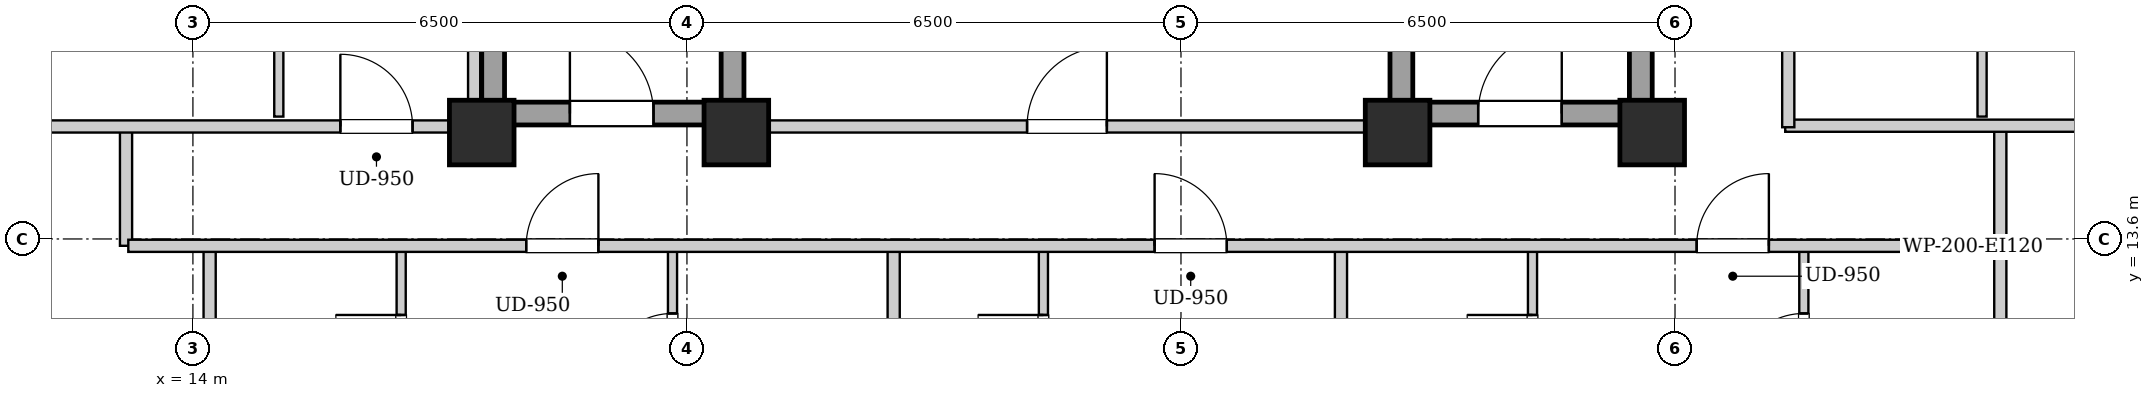
"""IFC4 building model, lengths in metres.
Left out: names, types, materials, properties, quantities, classifications, styles, units other than length and angle.
Written with IfcOpenShell. Run it as: python <this file> out.ifc"""

import sys

from ifc_helpers import new_model, si_unit, direction, frame, frame_2d, origin, origin_2d, place, context, subcontext, project, spatial, rectangle, extrude, element, fill, save


model = new_model("IFC4")
c1 = context("Model", 3, precision=1e-05, world=origin(), true_north=direction((0.0, 1.0)))
c2 = subcontext(c1, "Body", "Model", "MODEL_VIEW")
j1 = project(units=[si_unit("LENGTHUNIT", "METRE"), si_unit("PLANEANGLEUNIT", "RADIAN")], contexts=[c1])
p1 = place(None, origin())
s1 = spatial("IfcSite", under=j1, at=p1, CompositionType="ELEMENT")
p2 = place(p1, origin())
s2 = spatial("IfcBuilding", under=s1, at=p2, CompositionType="ELEMENT")
p3 = place(p2, frame((0.0, 0.0, 210.7)))
s3 = spatial("IfcBuildingStorey", under=s2, at=p3, CompositionType="ELEMENT", Elevation=210.7)
for number, where, z_axis, x_axis in (
    (1, (17.8, 15.0, 0.0), (0.0, 0.0, 1.0), (1.0, 0.0, 0.0)),
    (2, (21.15, 15.0, 0.0), (0.0, 0.0, 1.0), (1.0, 0.0, 0.0)),
    (3, (29.85, 15.0, 0.0), (0.0, 0.0, 1.0), (1.0, 0.0, 0.0)),
    (4, (33.2, 15.0, 0.0), (0.0, 0.0, 1.0), (1.0, 0.0, 0.0)),
):
    element("IfcColumn", number, at=place(p3, frame(where, z_axis=z_axis, x_axis=x_axis)), inside=s3, PredefinedType="COLUMN", context=c2, shape_type="SweptSolid", body=[
        extrude(rectangle(XDim=0.85, YDim=0.85, at=origin_2d()), origin(), (0.0, 0.0, 1.0), 3.3),
    ])
for number, where, z_axis, x_axis in (
    (5, (17.95, 15.1, 0.0), (0.0, 0.0, 1.0), (0.0, 1.0, 0.0)),
    (6, (21.1, 15.1, 0.0), (0.0, 0.0, 1.0), (0.0, 1.0, 0.0)),
):
    element("IfcWall", number, at=place(p3, frame(where, z_axis=z_axis, x_axis=x_axis)), inside=s3, PredefinedType="SHEAR", context=c2, shape_type="SweptSolid", body=[
        extrude(rectangle(XDim=9.0, YDim=0.3, at=frame_2d((4.5, 0.0))), origin(), (0.0, 0.0, 1.0), 3.04),
    ])
p4 = place(p3, frame((18.1, 15.25, 0.0), z_axis=(0.0, 0.0, 1.0), x_axis=(1.0, 0.0, 0.0)))
e7 = element("IfcWall", 7, at=p4, inside=s3, PredefinedType="SHEAR", context=c2, shape_type="SweptSolid", body=[
    extrude(rectangle(XDim=2.85, YDim=0.3, at=frame_2d((1.425, 0.0))), origin(), (0.0, 0.0, 1.0), 3.04),
])
p5 = place(p4, frame((0.86, 0.0, 0.0)))
e8 = element("IfcOpeningElement", 8, at=p5, cuts=e7, PredefinedType="OPENING", context=c2, shape_type="SweptSolid", body=[
    extrude(rectangle(XDim=1.1, YDim=2.05, at=frame_2d((0.55, 1.025))), frame((0.0, 0.16, 0.0), z_axis=(0.0, -1.0, 0.0), x_axis=(1.0, 0.0, 0.0)), (0.0, 0.0, 1.0), 0.32),
])
for number, where, z_axis, x_axis in (
    (9, (29.9, 15.1, 0.0), (0.0, 0.0, 1.0), (0.0, 1.0, 0.0)),
    (10, (33.05, 15.1, 0.0), (0.0, 0.0, 1.0), (0.0, 1.0, 0.0)),
):
    element("IfcWall", number, at=place(p3, frame(where, z_axis=z_axis, x_axis=x_axis)), inside=s3, PredefinedType="SHEAR", context=c2, shape_type="SweptSolid", body=[
        extrude(rectangle(XDim=9.0, YDim=0.3, at=frame_2d((4.5, 0.0))), origin(), (0.0, 0.0, 1.0), 3.04),
    ])
p6 = place(p3, frame((30.05, 15.25, 0.0), z_axis=(0.0, 0.0, 1.0), x_axis=(1.0, 0.0, 0.0)))
e11 = element("IfcWall", 11, at=p6, inside=s3, PredefinedType="SHEAR", context=c2, shape_type="SweptSolid", body=[
    extrude(rectangle(XDim=2.85, YDim=0.3, at=frame_2d((1.425, 0.0))), origin(), (0.0, 0.0, 1.0), 3.04),
])
p7 = place(p6, frame((0.86, 0.0, 0.0)))
e12 = element("IfcOpeningElement", 12, at=p7, cuts=e11, PredefinedType="OPENING", context=c2, shape_type="SweptSolid", body=[
    extrude(rectangle(XDim=1.1, YDim=2.05, at=frame_2d((0.55, 1.025))), frame((0.0, 0.16, 0.0), z_axis=(0.0, -1.0, 0.0), x_axis=(1.0, 0.0, 0.0)), (0.0, 0.0, 1.0), 0.32),
])
p8 = place(p3, frame((21.25, 15.08, 0.0), z_axis=(0.0, 0.0, 1.0), x_axis=(1.0, 0.0, 0.0)))
e13 = element("IfcWall", 13, at=p8, inside=s3, PredefinedType="PARTITIONING", context=c2, shape_type="SweptSolid", body=[
    extrude(rectangle(XDim=8.5, YDim=0.16, at=frame_2d((4.25, 0.0))), origin(), (0.0, 0.0, 1.0), 2.556),
])
p9 = place(p8, frame((3.725, 0.0, 0.0)))
e14 = element("IfcOpeningElement", 14, at=p9, cuts=e13, PredefinedType="OPENING", context=c2, shape_type="SweptSolid", body=[
    extrude(rectangle(XDim=1.05, YDim=2.05, at=frame_2d((0.525, 1.025))), frame((0.0, 0.09, 0.0), z_axis=(0.0, -1.0, 0.0), x_axis=(1.0, 0.0, 0.0)), (0.0, 0.0, 1.0), 0.18),
])
for number, where, z_axis, x_axis in (
    (15, (13.12, 13.51, 0.0), (0.0, 0.0, 1.0), (0.0, 1.0, 0.0)),
    (16, (37.78, 13.51, 0.0), (0.0, 0.0, 1.0), (0.0, 1.0, 0.0)),
):
    element("IfcWall", number, at=place(p3, frame(where, z_axis=z_axis, x_axis=x_axis)), inside=s3, PredefinedType="PARTITIONING", context=c2, shape_type="SweptSolid", body=[
        extrude(rectangle(XDim=1.58, YDim=0.16, at=frame_2d((0.79, 0.0))), origin(), (0.0, 0.0, 1.0), 3.04),
    ])
p10 = place(p3, frame((34.95, 15.09, 0.0), z_axis=(0.0, 0.0, 1.0), x_axis=(1.0, 0.0, 0.0)))
e17 = element("IfcWall", 17, at=p10, inside=s3, PredefinedType="PARTITIONING", context=c2, shape_type="SweptSolid", body=[
    extrude(rectangle(XDim=5.07, YDim=0.16, at=frame_2d((2.535, 0.0))), origin(), (0.0, 0.0, 1.0), 2.556),
])
p11 = place(p3, frame((14.22, 4.08, 0.0), z_axis=(0.0, 0.0, 1.0), x_axis=(0.0, 1.0, 0.0)))
e18 = element("IfcWall", 18, at=p11, inside=s3, PredefinedType="PARTITIONING", context=c2, shape_type="SweptSolid", body=[
    extrude(rectangle(XDim=9.39, YDim=0.16, at=frame_2d((4.695, 0.0))), origin(), (0.0, 0.0, 1.0), 3.04),
])
p12 = place(p3, frame((16.74, 10.87, 0.0), z_axis=(0.0, 0.0, 1.0), x_axis=(0.0, 1.0, 0.0)))
e19 = element("IfcWall", 19, at=p12, inside=s3, PredefinedType="PARTITIONING", context=c2, shape_type="SweptSolid", body=[
    extrude(rectangle(XDim=2.6, YDim=0.12, at=frame_2d((1.3, 0.0))), origin(), (0.0, 0.0, 1.0), 3.04),
])
p13 = place(p12, frame((0.87, 0.0, 0.0)))
e20 = element("IfcOpeningElement", 20, at=p13, cuts=e19, PredefinedType="OPENING", context=c2, shape_type="SweptSolid", body=[
    extrude(rectangle(XDim=0.86, YDim=2.05, at=frame_2d((0.43, 1.025))), frame((0.0, 0.07, 0.0), z_axis=(0.0, -1.0, 0.0), x_axis=(1.0, 0.0, 0.0)), (0.0, 0.0, 1.0), 0.14),
])
p14 = place(p3, frame((20.31, 10.87, 0.0), z_axis=(0.0, 0.0, 1.0), x_axis=(0.0, 1.0, 0.0)))
e21 = element("IfcWall", 21, at=p14, inside=s3, PredefinedType="PARTITIONING", context=c2, shape_type="SweptSolid", body=[
    extrude(rectangle(XDim=2.6, YDim=0.12, at=frame_2d((1.3, 0.0))), origin(), (0.0, 0.0, 1.0), 3.04),
])
p15 = place(p14, frame((0.85, 0.0, 0.0)))
e22 = element("IfcOpeningElement", 22, at=p15, cuts=e21, PredefinedType="OPENING", context=c2, shape_type="SweptSolid", body=[
    extrude(rectangle(XDim=0.9, YDim=2.05, at=frame_2d((0.45, 1.025))), frame((0.0, 0.07, 0.0), z_axis=(0.0, -1.0, 0.0), x_axis=(1.0, 0.0, 0.0)), (0.0, 0.0, 1.0), 0.14),
])
p16 = place(p3, frame((23.22, 4.08, 0.0), z_axis=(0.0, 0.0, 1.0), x_axis=(0.0, 1.0, 0.0)))
e23 = element("IfcWall", 23, at=p16, inside=s3, PredefinedType="PARTITIONING", context=c2, shape_type="SweptSolid", body=[
    extrude(rectangle(XDim=9.39, YDim=0.16, at=frame_2d((4.695, 0.0))), origin(), (0.0, 0.0, 1.0), 3.04),
])
p17 = place(p3, frame((25.19, 10.87, 0.0), z_axis=(0.0, 0.0, 1.0), x_axis=(0.0, 1.0, 0.0)))
e24 = element("IfcWall", 24, at=p17, inside=s3, PredefinedType="PARTITIONING", context=c2, shape_type="SweptSolid", body=[
    extrude(rectangle(XDim=2.6, YDim=0.12, at=frame_2d((1.3, 0.0))), origin(), (0.0, 0.0, 1.0), 3.04),
])
p18 = place(p17, frame((0.87, 0.0, 0.0)))
e25 = element("IfcOpeningElement", 25, at=p18, cuts=e24, PredefinedType="OPENING", context=c2, shape_type="SweptSolid", body=[
    extrude(rectangle(XDim=0.86, YDim=2.05, at=frame_2d((0.43, 1.025))), frame((0.0, 0.07, 0.0), z_axis=(0.0, -1.0, 0.0), x_axis=(1.0, 0.0, 0.0)), (0.0, 0.0, 1.0), 0.14),
])
p19 = place(p3, frame((37.78, 10.81, 0.0), z_axis=(0.0, 0.0, 1.0), x_axis=(0.0, 1.0, 0.0)))
e26 = element("IfcWall", 26, at=p19, inside=s3, PredefinedType="PARTITIONING", context=c2, shape_type="SweptSolid", body=[
    extrude(rectangle(XDim=2.66, YDim=0.16, at=frame_2d((1.33, 0.0))), origin(), (0.0, 0.0, 1.0), 3.04),
])
p20 = place(p3, frame((29.105, 4.08, 0.0), z_axis=(0.0, 0.0, 1.0), x_axis=(0.0, 1.0, 0.0)))
e27 = element("IfcWall", 27, at=p20, inside=s3, PredefinedType="PARTITIONING", context=c2, shape_type="SweptSolid", body=[
    extrude(rectangle(XDim=9.39, YDim=0.16, at=frame_2d((4.695, 0.0))), origin(), (0.0, 0.0, 1.0), 3.04),
])
p21 = place(p3, frame((31.625, 10.87, 0.0), z_axis=(0.0, 0.0, 1.0), x_axis=(0.0, 1.0, 0.0)))
e28 = element("IfcWall", 28, at=p21, inside=s3, PredefinedType="PARTITIONING", context=c2, shape_type="SweptSolid", body=[
    extrude(rectangle(XDim=2.6, YDim=0.12, at=frame_2d((1.3, 0.0))), origin(), (0.0, 0.0, 1.0), 3.04),
])
p22 = place(p21, frame((0.87, 0.0, 0.0)))
e29 = element("IfcOpeningElement", 29, at=p22, cuts=e28, PredefinedType="OPENING", context=c2, shape_type="SweptSolid", body=[
    extrude(rectangle(XDim=0.86, YDim=2.05, at=frame_2d((0.43, 1.025))), frame((0.0, 0.07, 0.0), z_axis=(0.0, -1.0, 0.0), x_axis=(1.0, 0.0, 0.0)), (0.0, 0.0, 1.0), 0.14),
])
p23 = place(p3, frame((35.195, 10.87, 0.0), z_axis=(0.0, 0.0, 1.0), x_axis=(0.0, 1.0, 0.0)))
e30 = element("IfcWall", 30, at=p23, inside=s3, PredefinedType="PARTITIONING", context=c2, shape_type="SweptSolid", body=[
    extrude(rectangle(XDim=2.6, YDim=0.12, at=frame_2d((1.3, 0.0))), origin(), (0.0, 0.0, 1.0), 3.04),
])
p24 = place(p23, frame((0.85, 0.0, 0.0)))
e31 = element("IfcOpeningElement", 31, at=p24, cuts=e30, PredefinedType="OPENING", context=c2, shape_type="SweptSolid", body=[
    extrude(rectangle(XDim=0.9, YDim=2.05, at=frame_2d((0.45, 1.025))), frame((0.0, 0.07, 0.0), z_axis=(0.0, -1.0, 0.0), x_axis=(1.0, 0.0, 0.0)), (0.0, 0.0, 1.0), 0.14),
])
p25 = place(p3, frame((10.88, 15.08, 0.0), z_axis=(0.0, 0.0, 1.0), x_axis=(1.0, 0.0, 0.0)))
e32 = element("IfcWall", 32, at=p25, inside=s3, PredefinedType="PARTITIONING", context=c2, shape_type="SweptSolid", body=[
    extrude(rectangle(XDim=6.88, YDim=0.16, at=frame_2d((3.44, 0.0))), origin(), (0.0, 0.0, 1.0), 2.556),
])
p26 = place(p25, frame((5.06, 0.0, 0.0)))
e33 = element("IfcOpeningElement", 33, at=p26, cuts=e32, PredefinedType="OPENING", context=c2, shape_type="SweptSolid", body=[
    extrude(rectangle(XDim=0.95, YDim=2.1, at=frame_2d((0.475, 1.05))), frame((0.0, 0.09, 0.0), z_axis=(0.0, -1.0, 0.0), x_axis=(1.0, 0.0, 0.0)), (0.0, 0.0, 1.0), 0.18),
])
p27 = place(p3, frame((15.13, 15.21, 0.0), z_axis=(0.0, 0.0, 1.0), x_axis=(0.0, 1.0, 0.0)))
e34 = element("IfcWall", 34, at=p27, inside=s3, PredefinedType="PARTITIONING", context=c2, shape_type="SweptSolid", body=[
    extrude(rectangle(XDim=4.308, YDim=0.12, at=frame_2d((2.154, 0.0))), origin(), (0.0, 0.0, 1.0), 3.04),
])
p28 = place(p27, frame((1.704, 0.0, 0.0)))
e35 = element("IfcOpeningElement", 35, at=p28, cuts=e34, PredefinedType="OPENING", context=c2, shape_type="SweptSolid", body=[
    extrude(rectangle(XDim=0.9, YDim=2.05, at=frame_2d((0.45, 1.025))), frame((0.0, 0.07, 0.0), z_axis=(0.0, -1.0, 0.0), x_axis=(1.0, 0.0, 0.0)), (0.0, 0.0, 1.0), 0.14),
])
p29 = place(p3, frame((37.54, 15.21, 0.0), z_axis=(0.0, 0.0, 1.0), x_axis=(0.0, 1.0, 0.0)))
e36 = element("IfcWall", 36, at=p29, inside=s3, PredefinedType="PARTITIONING", context=c2, shape_type="SweptSolid", body=[
    extrude(rectangle(XDim=1.85, YDim=0.12, at=frame_2d((0.925, 0.0))), origin(), (0.0, 0.0, 1.0), 3.04),
])
p30 = place(p3, frame((13.15, 13.51, 0.0), z_axis=(0.0, 0.0, 1.0), x_axis=(1.0, 0.0, 0.0)))
e37 = element("IfcWall", 37, at=p30, inside=s3, PredefinedType="PARTITIONING", context=c2, shape_type="SweptSolid", body=[
    extrude(rectangle(XDim=24.6, YDim=0.16, at=frame_2d((12.3, 0.0))), origin(), (0.0, 0.0, 1.0), 3.04),
])
p31 = place(p30, frame((5.235, 0.0, 0.0)))
e38 = element("IfcOpeningElement", 38, at=p31, cuts=e37, PredefinedType="OPENING", context=c2, shape_type="SweptSolid", body=[
    extrude(rectangle(XDim=0.95, YDim=2.1, at=frame_2d((0.475, 1.05))), frame((0.0, 0.09, 0.0), z_axis=(0.0, -1.0, 0.0), x_axis=(1.0, 0.0, 0.0)), (0.0, 0.0, 1.0), 0.18),
])
p32 = place(p30, frame((13.503, 0.0, 0.0)))
e39 = element("IfcOpeningElement", 39, at=p32, cuts=e37, PredefinedType="OPENING", context=c2, shape_type="SweptSolid", body=[
    extrude(rectangle(XDim=0.95, YDim=2.1, at=frame_2d((0.475, 1.05))), frame((0.0, 0.09, 0.0), z_axis=(0.0, -1.0, 0.0), x_axis=(1.0, 0.0, 0.0)), (0.0, 0.0, 1.0), 0.18),
])
p33 = place(p30, frame((20.635, 0.0, 0.0)))
e40 = element("IfcOpeningElement", 40, at=p33, cuts=e37, PredefinedType="OPENING", context=c2, shape_type="SweptSolid", body=[
    extrude(rectangle(XDim=0.95, YDim=2.1, at=frame_2d((0.475, 1.05))), frame((0.0, 0.09, 0.0), z_axis=(0.0, -1.0, 0.0), x_axis=(1.0, 0.0, 0.0)), (0.0, 0.0, 1.0), 0.18),
])
p34 = place(p3, frame((17.7, 15.02, 0.0), z_axis=(0.0, 0.0, 1.0), x_axis=(0.0, 1.0, 0.0)))
e41 = element("IfcWall", 41, at=p34, inside=s3, PredefinedType="PARTITIONING", context=c2, shape_type="SweptSolid", body=[
    extrude(rectangle(XDim=13.98, YDim=0.16, at=frame_2d((6.99, 0.0))), origin(), (0.0, 0.0, 1.0), 3.04),
])
p35 = place(p3, frame((34.99, 15.07, 0.0), z_axis=(0.0, 0.0, 1.0), x_axis=(0.0, 1.0, 0.0)))
e42 = element("IfcWall", 42, at=p35, inside=s3, PredefinedType="PARTITIONING", context=c2, shape_type="SweptSolid", body=[
    extrude(rectangle(XDim=13.93, YDim=0.16, at=frame_2d((6.965, 0.0))), origin(), (0.0, 0.0, 1.0), 3.04),
])
p36 = place(p35, frame((3.608, 0.0, 0.0)))
e43 = element("IfcOpeningElement", 43, at=p36, cuts=e42, PredefinedType="OPENING", context=c2, shape_type="SweptSolid", body=[
    extrude(rectangle(XDim=0.95, YDim=2.1, at=frame_2d((0.475, 1.05))), frame((0.0, 0.09, 0.0), z_axis=(0.0, -1.0, 0.0), x_axis=(1.0, 0.0, 0.0)), (0.0, 0.0, 1.0), 0.18),
])
p37 = place(p35, frame((10.649, 0.0, 0.0)))
e44 = element("IfcOpeningElement", 44, at=p37, cuts=e42, PredefinedType="OPENING", context=c2, shape_type="SweptSolid", body=[
    extrude(rectangle(XDim=0.95, YDim=2.1, at=frame_2d((0.475, 1.05))), frame((0.0, 0.09, 0.0), z_axis=(0.0, -1.0, 0.0), x_axis=(1.0, 0.0, 0.0)), (0.0, 0.0, 1.0), 0.18),
])
p38 = place(p5, origin())
e45 = element("IfcDoor", 45, at=p38, inside=s3, OperationType="SINGLE_SWING_LEFT", PredefinedType="DOOR", context=c2, shape_type="SweptSolid", body=[
    extrude(rectangle(XDim=1.1, YDim=2.05, at=frame_2d((0.55, 1.025))), frame((0.0, 0.025, 0.0), z_axis=(0.0, -1.0, 0.0), x_axis=(1.0, 0.0, 0.0)), (0.0, 0.0, 1.0), 0.05),
])
fill(e8, e45)
p39 = place(p7, origin())
e46 = element("IfcDoor", 46, at=p39, inside=s3, OperationType="SINGLE_SWING_RIGHT", PredefinedType="DOOR", context=c2, shape_type="SweptSolid", body=[
    extrude(rectangle(XDim=1.1, YDim=2.05, at=frame_2d((0.55, 1.025))), frame((0.0, 0.025, 0.0), z_axis=(0.0, -1.0, 0.0), x_axis=(1.0, 0.0, 0.0)), (0.0, 0.0, 1.0), 0.05),
])
fill(e12, e46)
p40 = place(p9, origin())
e47 = element("IfcDoor", 47, at=p40, inside=s3, OperationType="SINGLE_SWING_RIGHT", PredefinedType="DOOR", context=c2, shape_type="SweptSolid", body=[
    extrude(rectangle(XDim=1.05, YDim=2.05, at=frame_2d((0.525, 1.025))), frame((0.0, 0.025, 0.0), z_axis=(0.0, -1.0, 0.0), x_axis=(1.0, 0.0, 0.0)), (0.0, 0.0, 1.0), 0.05),
])
fill(e14, e47)
p41 = place(p13, origin())
e48 = element("IfcDoor", 48, at=p41, inside=s3, OperationType="SINGLE_SWING_RIGHT", PredefinedType="DOOR", context=c2, shape_type="SweptSolid", body=[
    extrude(rectangle(XDim=0.86, YDim=2.05, at=frame_2d((0.43, 1.025))), frame((0.0, 0.025, 0.0), z_axis=(0.0, -1.0, 0.0), x_axis=(1.0, 0.0, 0.0)), (0.0, 0.0, 1.0), 0.05),
])
fill(e20, e48)
p42 = place(p15, origin())
e49 = element("IfcDoor", 49, at=p42, inside=s3, OperationType="SINGLE_SWING_LEFT", PredefinedType="DOOR", context=c2, shape_type="SweptSolid", body=[
    extrude(rectangle(XDim=0.9, YDim=2.05, at=frame_2d((0.45, 1.025))), frame((0.0, 0.025, 0.0), z_axis=(0.0, -1.0, 0.0), x_axis=(1.0, 0.0, 0.0)), (0.0, 0.0, 1.0), 0.05),
])
fill(e22, e49)
p43 = place(p18, origin())
e50 = element("IfcDoor", 50, at=p43, inside=s3, OperationType="SINGLE_SWING_RIGHT", PredefinedType="DOOR", context=c2, shape_type="SweptSolid", body=[
    extrude(rectangle(XDim=0.86, YDim=2.05, at=frame_2d((0.43, 1.025))), frame((0.0, 0.025, 0.0), z_axis=(0.0, -1.0, 0.0), x_axis=(1.0, 0.0, 0.0)), (0.0, 0.0, 1.0), 0.05),
])
fill(e25, e50)
p44 = place(p22, origin())
e51 = element("IfcDoor", 51, at=p44, inside=s3, OperationType="SINGLE_SWING_RIGHT", PredefinedType="DOOR", context=c2, shape_type="SweptSolid", body=[
    extrude(rectangle(XDim=0.86, YDim=2.05, at=frame_2d((0.43, 1.025))), frame((0.0, 0.025, 0.0), z_axis=(0.0, -1.0, 0.0), x_axis=(1.0, 0.0, 0.0)), (0.0, 0.0, 1.0), 0.05),
])
fill(e29, e51)
p45 = place(p24, origin())
e52 = element("IfcDoor", 52, at=p45, inside=s3, OperationType="SINGLE_SWING_LEFT", PredefinedType="DOOR", context=c2, shape_type="SweptSolid", body=[
    extrude(rectangle(XDim=0.9, YDim=2.05, at=frame_2d((0.45, 1.025))), frame((0.0, 0.025, 0.0), z_axis=(0.0, -1.0, 0.0), x_axis=(1.0, 0.0, 0.0)), (0.0, 0.0, 1.0), 0.05),
])
fill(e31, e52)
p46 = place(p26, origin())
e53 = element("IfcDoor", 53, at=p46, inside=s3, OperationType="SINGLE_SWING_LEFT", PredefinedType="DOOR", context=c2, shape_type="SweptSolid", body=[
    extrude(rectangle(XDim=0.95, YDim=2.1, at=frame_2d((0.475, 1.05))), frame((0.0, 0.025, 0.0), z_axis=(0.0, -1.0, 0.0), x_axis=(1.0, 0.0, 0.0)), (0.0, 0.0, 1.0), 0.05),
])
fill(e33, e53)
p47 = place(p31, origin())
e54 = element("IfcDoor", 54, at=p47, inside=s3, OperationType="SINGLE_SWING_RIGHT", PredefinedType="DOOR", context=c2, shape_type="SweptSolid", body=[
    extrude(rectangle(XDim=0.95, YDim=2.1, at=frame_2d((0.475, 1.05))), frame((0.0, 0.025, 0.0), z_axis=(0.0, -1.0, 0.0), x_axis=(1.0, 0.0, 0.0)), (0.0, 0.0, 1.0), 0.05),
])
fill(e38, e54)
p48 = place(p32, origin())
e55 = element("IfcDoor", 55, at=p48, inside=s3, OperationType="SINGLE_SWING_LEFT", PredefinedType="DOOR", context=c2, shape_type="SweptSolid", body=[
    extrude(rectangle(XDim=0.95, YDim=2.1, at=frame_2d((0.475, 1.05))), frame((0.0, 0.025, 0.0), z_axis=(0.0, -1.0, 0.0), x_axis=(1.0, 0.0, 0.0)), (0.0, 0.0, 1.0), 0.05),
])
fill(e39, e55)
p49 = place(p33, origin())
e56 = element("IfcDoor", 56, at=p49, inside=s3, OperationType="SINGLE_SWING_RIGHT", PredefinedType="DOOR", context=c2, shape_type="SweptSolid", body=[
    extrude(rectangle(XDim=0.95, YDim=2.1, at=frame_2d((0.475, 1.05))), frame((0.0, 0.025, 0.0), z_axis=(0.0, -1.0, 0.0), x_axis=(1.0, 0.0, 0.0)), (0.0, 0.0, 1.0), 0.05),
])
fill(e40, e56)
save(model, sys.argv[1])
